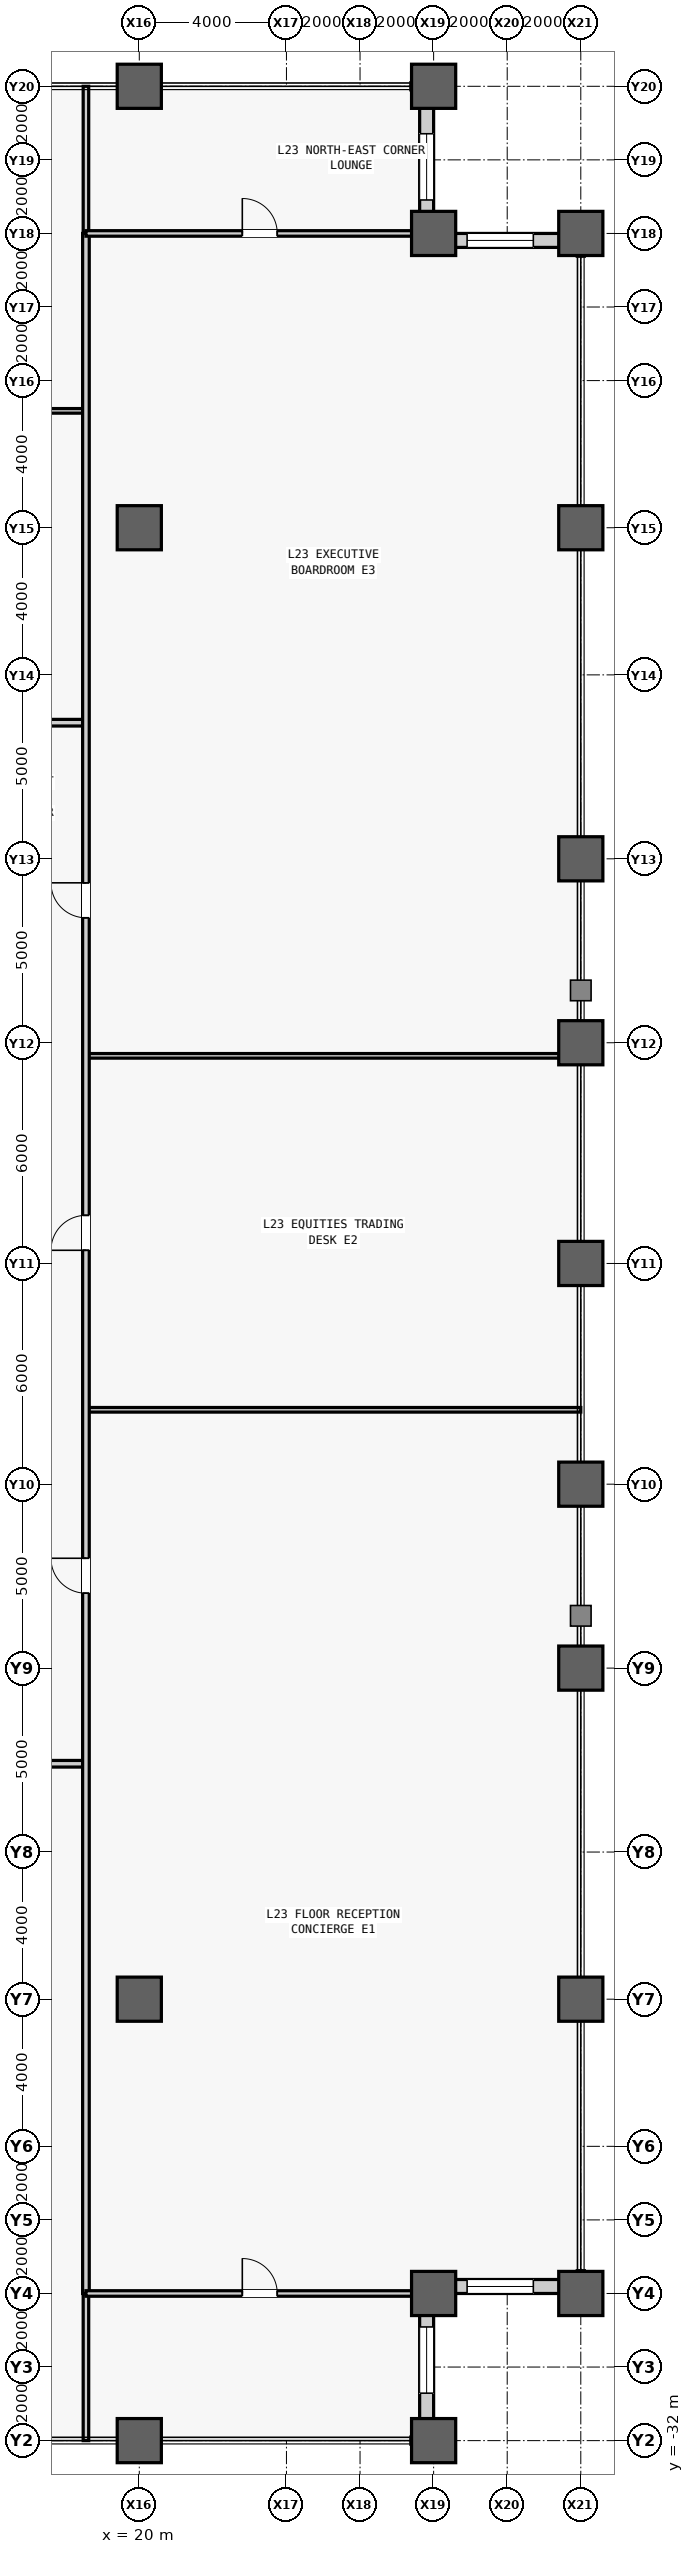
"""IFC4 building model, lengths in metres.
Left out: names, types, materials, properties, quantities, classifications, styles, units other than length and angle.
Written with IfcOpenShell. Run it as: python <this file> out.ifc"""

import sys

from ifc_helpers import new_model, si_unit, direction, frame, frame_2d, origin, origin_2d, place, context, subcontext, project, spatial, rectangle, hollow_rectangle, extrude, source, transform, mapped, element, fill, save


model = new_model("IFC4")
c1 = context("Model", 3, precision=1e-05, world=origin(), true_north=direction((0.0, 1.0)))
c2 = subcontext(c1, "Body", "Model", "MODEL_VIEW")
j1 = project(units=[si_unit("LENGTHUNIT", "METRE"), si_unit("PLANEANGLEUNIT", "RADIAN")], contexts=[c1])
p1 = place(None, origin())
s1 = spatial("IfcSite", under=j1, at=p1, CompositionType="ELEMENT")
p2 = place(p1, origin())
s2 = spatial("IfcBuilding", under=s1, at=p2, CompositionType="ELEMENT")
p3 = place(p2, frame((0.0, 0.0, 103.7)))
s3 = spatial("IfcBuildingStorey", under=s2, at=p3, CompositionType="ELEMENT", Elevation=103.7)
m1 = source(origin(), c2, "Body", "SweptSolid", [
    extrude(hollow_rectangle(XDim=1.2, YDim=1.2, WallThickness=0.07, at=origin_2d()), origin(), (0.0, 0.0, 1.0), 4.1),
])
for number, where, z_axis, x_axis in (
    (1, (20.0, -32.0, 0.0), (0.0, 0.0, 1.0), (1.0, 0.0, 0.0)),
    (2, (20.0, -20.0, 0.0), (0.0, 0.0, 1.0), (1.0, 0.0, 0.0)),
    (3, (20.0, 20.0, 0.0), (0.0, 0.0, 1.0), (1.0, 0.0, 0.0)),
    (4, (20.0, 32.0, 0.0), (0.0, 0.0, 1.0), (1.0, 0.0, 0.0)),
    (5, (28.0, -32.0, 0.0), (0.0, 0.0, 1.0), (1.0, 0.0, 0.0)),
    (6, (28.0, -28.0, 0.0), (0.0, 0.0, 1.0), (1.0, 0.0, 0.0)),
    (7, (28.0, 28.0, 0.0), (0.0, 0.0, 1.0), (1.0, 0.0, 0.0)),
    (8, (28.0, 32.0, 0.0), (0.0, 0.0, 1.0), (1.0, 0.0, 0.0)),
    (9, (32.0, -28.0, 0.0), (0.0, 0.0, 1.0), (1.0, 0.0, 0.0)),
    (10, (32.0, -20.0, 0.0), (0.0, 0.0, 1.0), (1.0, 0.0, 0.0)),
    (11, (32.0, -11.0, 0.0), (0.0, 0.0, 1.0), (1.0, 0.0, 0.0)),
    (12, (32.0, -6.0, 0.0), (0.0, 0.0, 1.0), (1.0, 0.0, 0.0)),
    (13, (32.0, 0.0, 0.0), (0.0, 0.0, 1.0), (1.0, 0.0, 0.0)),
    (14, (32.0, 6.0, 0.0), (0.0, 0.0, 1.0), (1.0, 0.0, 0.0)),
    (15, (32.0, 11.0, 0.0), (0.0, 0.0, 1.0), (1.0, 0.0, 0.0)),
    (16, (32.0, 20.0, 0.0), (0.0, 0.0, 1.0), (1.0, 0.0, 0.0)),
    (17, (32.0, 28.0, 0.0), (0.0, 0.0, 1.0), (1.0, 0.0, 0.0)),
):
    element("IfcColumn", number, at=place(p3, frame(where, z_axis=z_axis, x_axis=x_axis)), inside=s3, PredefinedType="COLUMN", context=c2, shape_type="MappedRepresentation", body=[
        mapped(m1, transform((0.0, 0.0, 0.0), scale=1.0)),
    ])
m2 = source(origin(), c2, "Body", "SweptSolid", [
    extrude(rectangle(XDim=3.62, YDim=0.38, at=frame_2d((1.81, 0.0))), origin(), (0.0, 0.0, 1.0), 3.145),
])
p4 = place(p3, frame((27.81, -31.62, 0.0), z_axis=(0.0, 0.0, 1.0), x_axis=(0.0, 1.0, 0.0)))
e18 = element("IfcWall", 18, at=p4, inside=s3, PredefinedType="STANDARD", context=c2, shape_type="MappedRepresentation", body=[
    mapped(m2, transform((0.0, 0.0, 0.0), scale=1.0)),
])
m3 = source(origin(), c2, "Body", "SweptSolid", [
    extrude(rectangle(XDim=1.8, YDim=2.4, at=frame_2d((0.9, 1.2))), frame((0.0, 0.2, 0.0), z_axis=(0.0, -1.0, 0.0), x_axis=(1.0, 0.0, 0.0)), (0.0, 0.0, 1.0), 0.4),
])
p5 = place(p4, frame((0.91, 0.0, 0.5)))
e19 = element("IfcOpeningElement", 19, at=p5, cuts=e18, PredefinedType="OPENING", context=c2, shape_type="MappedRepresentation", body=[
    mapped(m3, transform((0.0, 0.0, 0.0), scale=1.0)),
])
p6 = place(p3, frame((28.0, -27.81, 0.0), z_axis=(0.0, 0.0, 1.0), x_axis=(1.0, 0.0, 0.0)))
e20 = element("IfcWall", 20, at=p6, inside=s3, PredefinedType="STANDARD", context=c2, shape_type="MappedRepresentation", body=[
    mapped(m2, transform((0.0, 0.0, 0.0), scale=1.0)),
])
p7 = place(p6, frame((0.91, 0.0, 0.5)))
e21 = element("IfcOpeningElement", 21, at=p7, cuts=e20, PredefinedType="OPENING", context=c2, shape_type="MappedRepresentation", body=[
    mapped(m3, transform((0.0, 0.0, 0.0), scale=1.0)),
])
p8 = place(p3, frame((28.0, 27.81, 0.0), z_axis=(0.0, 0.0, 1.0), x_axis=(1.0, 0.0, 0.0)))
e22 = element("IfcWall", 22, at=p8, inside=s3, PredefinedType="STANDARD", context=c2, shape_type="MappedRepresentation", body=[
    mapped(m2, transform((0.0, 0.0, 0.0), scale=1.0)),
])
p9 = place(p8, frame((0.91, 0.0, 0.5)))
e23 = element("IfcOpeningElement", 23, at=p9, cuts=e22, PredefinedType="OPENING", context=c2, shape_type="MappedRepresentation", body=[
    mapped(m3, transform((0.0, 0.0, 0.0), scale=1.0)),
])
p10 = place(p3, frame((27.81, 28.0, 0.0), z_axis=(0.0, 0.0, 1.0), x_axis=(0.0, 1.0, 0.0)))
e24 = element("IfcWall", 24, at=p10, inside=s3, PredefinedType="STANDARD", context=c2, shape_type="MappedRepresentation", body=[
    mapped(m2, transform((0.0, 0.0, 0.0), scale=1.0)),
])
p11 = place(p10, frame((0.91, 0.0, 0.5)))
e25 = element("IfcOpeningElement", 25, at=p11, cuts=e24, PredefinedType="OPENING", context=c2, shape_type="MappedRepresentation", body=[
    mapped(m3, transform((0.0, 0.0, 0.0), scale=1.0)),
])
m4 = source(origin(), c2, "Body", "SweptSolid", [
    extrude(rectangle(XDim=36.25, YDim=0.18, at=frame_2d((18.125, 0.0))), origin(), (0.0, 0.0, 1.0), 3.84),
])
p12 = place(p3, frame((-17.7, -13.6, 0.0), z_axis=(0.0, 0.0, 1.0), x_axis=(1.0, 0.0, 0.0)))
e26 = element("IfcWall", 26, at=p12, inside=s3, PredefinedType="PARTITIONING", context=c2, shape_type="MappedRepresentation", body=[
    mapped(m4, transform((0.0, 0.0, 0.0), scale=1.0)),
])
m5 = source(origin(), c2, "Body", "SweptSolid", [
    extrude(rectangle(XDim=1.05, YDim=2.2, at=frame_2d((0.525, 1.1))), frame((0.0, 0.1, 0.0), z_axis=(0.0, -1.0, 0.0), x_axis=(1.0, 0.0, 0.0)), (0.0, 0.0, 1.0), 0.2),
])
p13 = place(p12, frame((6.925, 0.0, 0.0)))
e27 = element("IfcOpeningElement", 27, at=p13, cuts=e26, PredefinedType="OPENING", context=c2, shape_type="MappedRepresentation", body=[
    mapped(m5, transform((0.0, 0.0, 0.0), scale=1.0)),
])
p14 = place(p12, frame((17.6, 0.0, 0.0)))
e28 = element("IfcOpeningElement", 28, at=p14, cuts=e26, PredefinedType="OPENING", context=c2, shape_type="MappedRepresentation", body=[
    mapped(m5, transform((0.0, 0.0, 0.0), scale=1.0)),
])
p15 = place(p12, frame((27.85, 0.0, 0.0)))
e29 = element("IfcOpeningElement", 29, at=p15, cuts=e26, PredefinedType="OPENING", context=c2, shape_type="MappedRepresentation", body=[
    mapped(m5, transform((0.0, 0.0, 0.0), scale=1.0)),
])
m6 = source(origin(), c2, "Body", "SweptSolid", [
    extrude(rectangle(XDim=36.25, YDim=0.125, at=frame_2d((18.125, 0.0))), origin(), (0.0, 0.0, 1.0), 3.84),
])
p16 = place(p3, frame((-17.7, 23.177, 0.0), z_axis=(0.0, 0.0, 1.0), x_axis=(1.0, 0.0, 0.0)))
e30 = element("IfcWall", 30, at=p16, inside=s3, PredefinedType="PARTITIONING", context=c2, shape_type="MappedRepresentation", body=[
    mapped(m6, transform((0.0, 0.0, 0.0), scale=1.0)),
])
m7 = source(origin(), c2, "Body", "SweptSolid", [
    extrude(rectangle(XDim=0.95, YDim=2.15, at=frame_2d((0.475, 1.075))), frame((0.0, 0.073, 0.0), z_axis=(0.0, -1.0, 0.0), x_axis=(1.0, 0.0, 0.0)), (0.0, 0.0, 1.0), 0.145),
])
p17 = place(p16, frame((17.65, 0.0, 0.0)))
e31 = element("IfcOpeningElement", 31, at=p17, cuts=e30, PredefinedType="OPENING", context=c2, shape_type="MappedRepresentation", body=[
    mapped(m7, transform((0.0, 0.0, 0.0), scale=1.0)),
])
p18 = place(p3, frame((-17.7, 14.7, 0.0), z_axis=(0.0, 0.0, 1.0), x_axis=(1.0, 0.0, 0.0)))
e32 = element("IfcWall", 32, at=p18, inside=s3, PredefinedType="PARTITIONING", context=c2, shape_type="MappedRepresentation", body=[
    mapped(m4, transform((0.0, 0.0, 0.0), scale=1.0)),
])
p19 = place(p18, frame((17.175, 0.0, 0.0)))
e33 = element("IfcOpeningElement", 33, at=p19, cuts=e32, PredefinedType="OPENING", context=c2, shape_type="MappedRepresentation", body=[
    mapped(m5, transform((0.0, 0.0, 0.0), scale=1.0)),
])
m8 = source(origin(), c2, "Body", "SweptSolid", [
    extrude(rectangle(XDim=4.0, YDim=0.15, at=frame_2d((2.0, 0.0))), origin(), (0.0, 0.0, 1.0), 3.84),
])
for number, where, z_axis, x_axis in (
    (34, (18.55, -32.0, 0.0), (0.0, 0.0, 1.0), (0.0, 1.0, 0.0)),
    (35, (18.55, 28.0, 0.0), (0.0, 0.0, 1.0), (0.0, 1.0, 0.0)),
):
    element("IfcWall", number, at=place(p3, frame(where, z_axis=z_axis, x_axis=x_axis)), inside=s3, PredefinedType="PARTITIONING", context=c2, shape_type="MappedRepresentation", body=[
        mapped(m8, transform((0.0, 0.0, 0.0), scale=1.0)),
    ])
m9 = source(origin(), c2, "Body", "SweptSolid", [
    extrude(rectangle(XDim=13.45, YDim=0.125, at=frame_2d((6.725, 0.0))), origin(), (0.0, 0.0, 1.0), 3.84),
])
for number, where, z_axis, x_axis in (
    (36, (18.55, -3.978, 0.0), (0.0, 0.0, 1.0), (1.0, 0.0, 0.0)),
    (37, (18.55, 5.644, 0.0), (0.0, 0.0, 1.0), (1.0, 0.0, 0.0)),
):
    element("IfcWall", number, at=place(p3, frame(where, z_axis=z_axis, x_axis=x_axis)), inside=s3, PredefinedType="PARTITIONING", context=c2, shape_type="MappedRepresentation", body=[
        mapped(m9, transform((0.0, 0.0, 0.0), scale=1.0)),
    ])
m10 = source(origin(), c2, "Body", "SweptSolid", [
    extrude(rectangle(XDim=56.0, YDim=0.18, at=frame_2d((28.0, 0.0))), origin(), (0.0, 0.0, 1.0), 3.84),
])
p20 = place(p3, frame((18.55, -28.0, 0.0), z_axis=(0.0, 0.0, 1.0), x_axis=(0.0, 1.0, 0.0)))
e38 = element("IfcWall", 38, at=p20, inside=s3, PredefinedType="PARTITIONING", context=c2, shape_type="MappedRepresentation", body=[
    mapped(m10, transform((0.0, 0.0, 0.0), scale=1.0)),
])
m11 = source(origin(), c2, "Body", "SweptSolid", [
    extrude(rectangle(XDim=0.95, YDim=2.15, at=frame_2d((0.475, 1.075))), frame((0.0, 0.1, 0.0), z_axis=(0.0, -1.0, 0.0), x_axis=(1.0, 0.0, 0.0)), (0.0, 0.0, 1.0), 0.2),
])
p21 = place(p20, frame((19.036, 0.0, 0.0)))
e39 = element("IfcOpeningElement", 39, at=p21, cuts=e38, PredefinedType="OPENING", context=c2, shape_type="MappedRepresentation", body=[
    mapped(m11, transform((0.0, 0.0, 0.0), scale=1.0)),
])
p22 = place(p20, frame((28.358, 0.0, 0.0)))
e40 = element("IfcOpeningElement", 40, at=p22, cuts=e38, PredefinedType="OPENING", context=c2, shape_type="MappedRepresentation", body=[
    mapped(m11, transform((0.0, 0.0, 0.0), scale=1.0)),
])
p23 = place(p20, frame((37.397, 0.0, 0.0)))
e41 = element("IfcOpeningElement", 41, at=p23, cuts=e38, PredefinedType="OPENING", context=c2, shape_type="MappedRepresentation", body=[
    mapped(m11, transform((0.0, 0.0, 0.0), scale=1.0)),
])
m12 = source(origin(), c2, "Body", "SweptSolid", [
    extrude(rectangle(XDim=9.45, YDim=0.15, at=frame_2d((4.725, 0.0))), origin(), (0.0, 0.0, 1.0), 3.84),
])
p24 = place(p3, frame((18.55, -28.0, 0.0), z_axis=(0.0, 0.0, 1.0), x_axis=(1.0, 0.0, 0.0)))
e42 = element("IfcWall", 42, at=p24, inside=s3, PredefinedType="PARTITIONING", context=c2, shape_type="MappedRepresentation", body=[
    mapped(m12, transform((0.0, 0.0, 0.0), scale=1.0)),
])
m13 = source(origin(), c2, "Body", "SweptSolid", [
    extrude(rectangle(XDim=0.95, YDim=2.15, at=frame_2d((0.475, 1.075))), frame((0.0, 0.085, 0.0), z_axis=(0.0, -1.0, 0.0), x_axis=(1.0, 0.0, 0.0)), (0.0, 0.0, 1.0), 0.17),
])
p25 = place(p24, frame((4.25, 0.0, 0.0)))
e43 = element("IfcOpeningElement", 43, at=p25, cuts=e42, PredefinedType="OPENING", context=c2, shape_type="MappedRepresentation", body=[
    mapped(m13, transform((0.0, 0.0, 0.0), scale=1.0)),
])
p26 = place(p3, frame((18.55, 28.0, 0.0), z_axis=(0.0, 0.0, 1.0), x_axis=(1.0, 0.0, 0.0)))
e44 = element("IfcWall", 44, at=p26, inside=s3, PredefinedType="PARTITIONING", context=c2, shape_type="MappedRepresentation", body=[
    mapped(m12, transform((0.0, 0.0, 0.0), scale=1.0)),
])
p27 = place(p26, frame((4.25, 0.0, 0.0)))
e45 = element("IfcOpeningElement", 45, at=p27, cuts=e44, PredefinedType="OPENING", context=c2, shape_type="MappedRepresentation", body=[
    mapped(m13, transform((0.0, 0.0, 0.0), scale=1.0)),
])
m14 = source(origin(), c2, "Body", "SweptSolid", [
    extrude(rectangle(XDim=1.8, YDim=2.4, at=frame_2d((0.9, 1.2))), frame((0.0, 0.03, 0.0), z_axis=(0.0, -1.0, 0.0), x_axis=(1.0, 0.0, 0.0)), (0.0, 0.0, 1.0), 0.06),
])
p28 = place(p5, origin())
e46 = element("IfcWindow", 46, at=p28, inside=s3, PartitioningType="SINGLE_PANEL", PredefinedType="WINDOW", context=c2, shape_type="MappedRepresentation", body=[
    mapped(m14, transform((0.0, 0.0, 0.0), scale=1.0)),
])
fill(e19, e46)
p29 = place(p7, origin())
e47 = element("IfcWindow", 47, at=p29, inside=s3, PartitioningType="SINGLE_PANEL", PredefinedType="WINDOW", context=c2, shape_type="MappedRepresentation", body=[
    mapped(m14, transform((0.0, 0.0, 0.0), scale=1.0)),
])
fill(e21, e47)
p30 = place(p9, origin())
e48 = element("IfcWindow", 48, at=p30, inside=s3, PartitioningType="SINGLE_PANEL", PredefinedType="WINDOW", context=c2, shape_type="MappedRepresentation", body=[
    mapped(m14, transform((0.0, 0.0, 0.0), scale=1.0)),
])
fill(e23, e48)
p31 = place(p11, origin())
e49 = element("IfcWindow", 49, at=p31, inside=s3, PartitioningType="SINGLE_PANEL", PredefinedType="WINDOW", context=c2, shape_type="MappedRepresentation", body=[
    mapped(m14, transform((0.0, 0.0, 0.0), scale=1.0)),
])
fill(e25, e49)
m15 = source(origin(), c2, "Body", "SweptSolid", [
    extrude(rectangle(XDim=0.95, YDim=2.15, at=frame_2d((0.475, 1.075))), frame((0.0, 0.025, 0.0), z_axis=(0.0, -1.0, 0.0), x_axis=(1.0, 0.0, 0.0)), (0.0, 0.0, 1.0), 0.05),
])
p32 = place(p21, origin())
e50 = element("IfcDoor", 50, at=p32, inside=s3, OperationType="SINGLE_SWING_RIGHT", PredefinedType="DOOR", context=c2, shape_type="MappedRepresentation", body=[
    mapped(m15, transform((0.0, 0.0, 0.0), scale=1.0)),
])
fill(e39, e50)
p33 = place(p22, origin())
e51 = element("IfcDoor", 51, at=p33, inside=s3, OperationType="SINGLE_SWING_LEFT", PredefinedType="DOOR", context=c2, shape_type="MappedRepresentation", body=[
    mapped(m15, transform((0.0, 0.0, 0.0), scale=1.0)),
])
fill(e40, e51)
p34 = place(p23, origin())
e52 = element("IfcDoor", 52, at=p34, inside=s3, OperationType="SINGLE_SWING_RIGHT", PredefinedType="DOOR", context=c2, shape_type="MappedRepresentation", body=[
    mapped(m15, transform((0.0, 0.0, 0.0), scale=1.0)),
])
fill(e41, e52)
p35 = place(p25, origin())
e53 = element("IfcDoor", 53, at=p35, inside=s3, OperationType="SINGLE_SWING_LEFT", PredefinedType="DOOR", context=c2, shape_type="MappedRepresentation", body=[
    mapped(m15, transform((0.0, 0.0, 0.0), scale=1.0)),
])
fill(e43, e53)
p36 = place(p27, origin())
e54 = element("IfcDoor", 54, at=p36, inside=s3, OperationType="SINGLE_SWING_LEFT", PredefinedType="DOOR", context=c2, shape_type="MappedRepresentation", body=[
    mapped(m15, transform((0.0, 0.0, 0.0), scale=1.0)),
])
fill(e45, e54)
save(model, sys.argv[1])
